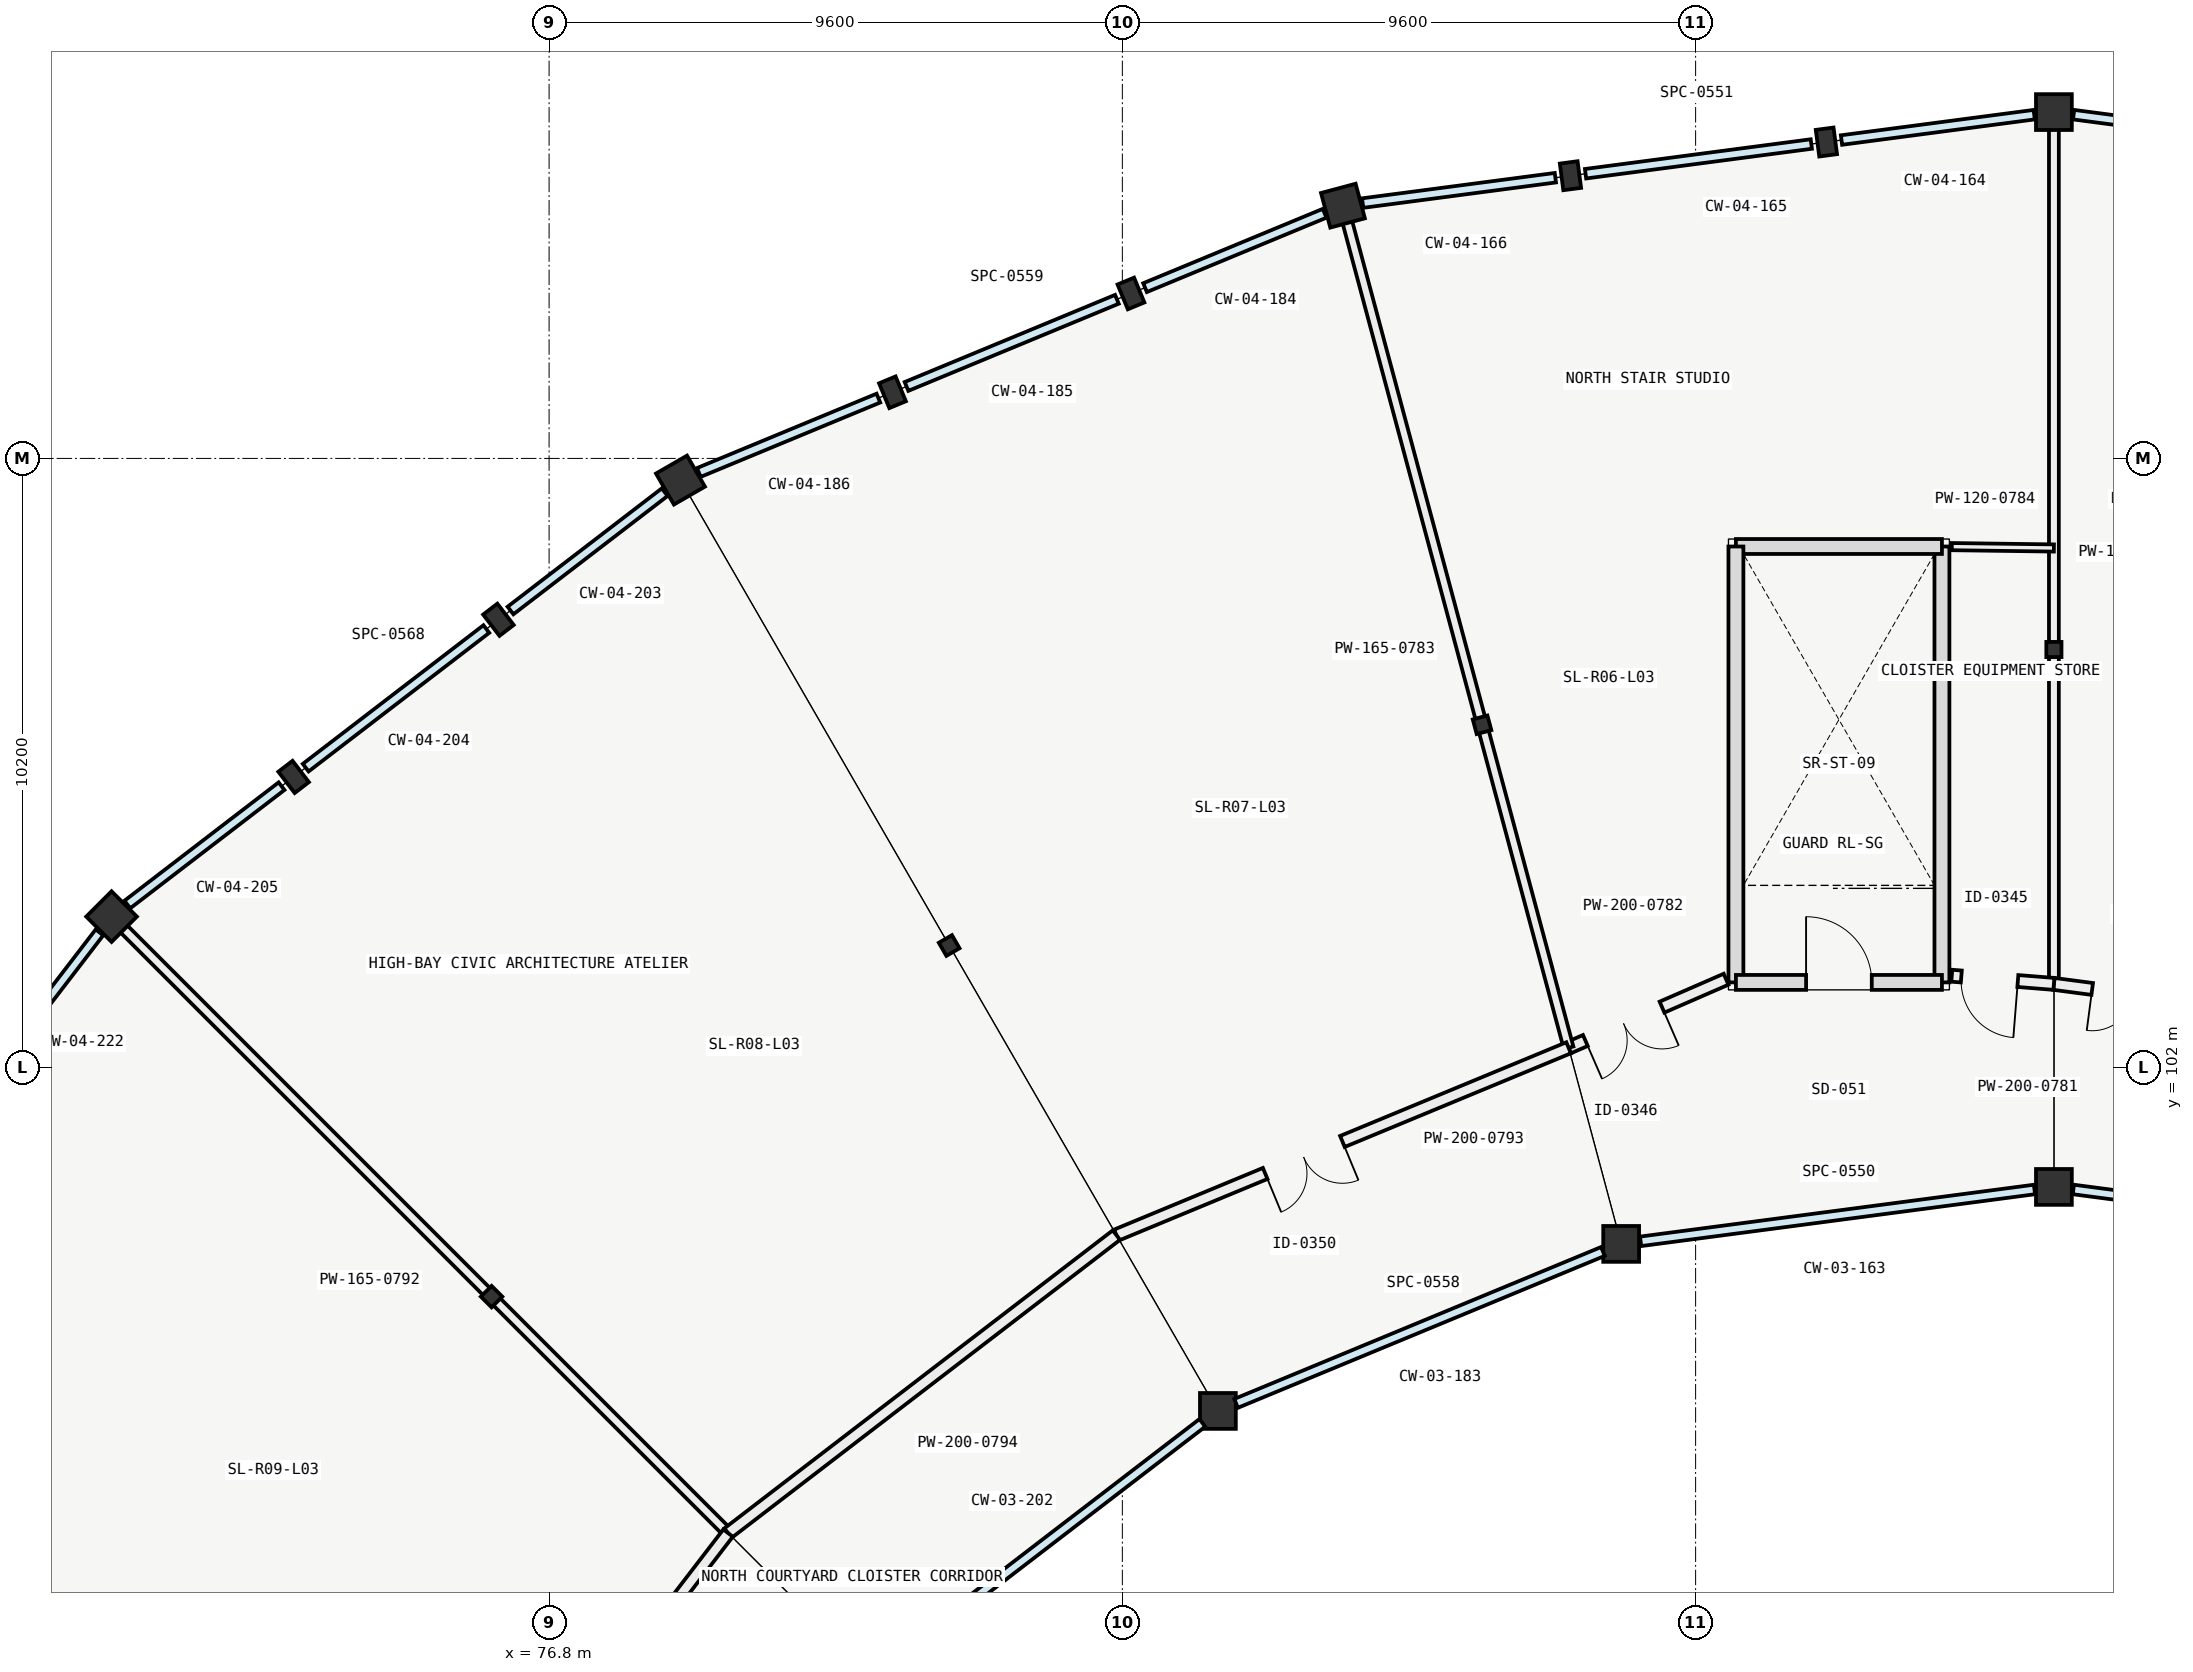
"""IFC4 building model, lengths in metres.
Left out: names, types, materials, properties, quantities, classifications, styles, units other than length and angle.
Written with IfcOpenShell. Run it as: python <this file> out.ifc"""

import sys

from ifc_helpers import new_model, si_unit, direction, frame, frame_2d, origin, origin_2d, place, context, subcontext, project, spatial, rectangle, circle, i_section, extrude, element, fill, save


model = new_model("IFC4")
c1 = context("Model", 3, precision=1e-05, world=origin(), true_north=direction((0.0, 1.0)))
c2 = subcontext(c1, "Body", "Model", "MODEL_VIEW")
j1 = project(units=[si_unit("LENGTHUNIT", "METRE"), si_unit("PLANEANGLEUNIT", "RADIAN")], contexts=[c1])
p1 = place(None, origin())
s1 = spatial("IfcSite", under=j1, at=p1, CompositionType="ELEMENT")
p2 = place(p1, origin())
s2 = spatial("IfcBuilding", under=s1, at=p2, CompositionType="ELEMENT")
p3 = place(p2, frame((0.0, 0.0, 13.8)))
s3 = spatial("IfcBuildingStorey", under=s2, at=p3, CompositionType="ELEMENT", Elevation=13.8)
p4 = place(p3, frame((102.0, 100.0, 0.0), z_axis=(0.0, 0.0, 1.0), x_axis=(0.0, 1.0, 0.0)))
e1 = element("IfcColumn", 1, at=p4, inside=s3, PredefinedType="COLUMN", context=c2, shape_type="SweptSolid", body=[
    extrude(circle(Radius=0.3, at=origin_2d()), origin(), (0.0, 0.0, 1.0), 4.2),
])
p5 = place(p3, frame((102.0, 109.0, 0.0), z_axis=(0.0, 0.0, 1.0), x_axis=(0.0, 1.0, 0.0)))
e2 = element("IfcColumn", 2, at=p5, inside=s3, PredefinedType="COLUMN", context=c2, shape_type="SweptSolid", body=[
    extrude(i_section(OverallWidth=0.254, OverallDepth=0.254, WebThickness=0.009, FlangeThickness=0.014, FilletRadius=0.014, at=origin_2d()), origin(), (0.0, 0.0, 1.0), 4.2),
])
p6 = place(p3, frame((102.0, 118.0, 0.0), z_axis=(0.0, 0.0, 1.0), x_axis=(0.0, 1.0, 0.0)))
e3 = element("IfcColumn", 3, at=p6, inside=s3, PredefinedType="COLUMN", context=c2, shape_type="SweptSolid", body=[
    extrude(rectangle(XDim=0.6, YDim=0.6, at=origin_2d()), origin(), (0.0, 0.0, 1.0), 4.2),
])
p7 = place(p3, frame((94.753, 99.046, 0.0), z_axis=(0.0, 0.0, 1.0), x_axis=(-0.258819045103, 0.965925826289, 0.0)))
e4 = element("IfcColumn", 4, at=p7, inside=s3, PredefinedType="COLUMN", context=c2, shape_type="SweptSolid", body=[
    extrude(circle(Radius=0.3, at=origin_2d()), origin(), (0.0, 0.0, 1.0), 4.2),
])
p8 = place(p3, frame((92.424, 107.739, 0.0), z_axis=(0.0, 0.0, 1.0), x_axis=(-0.258819045103, 0.965925826289, 0.0)))
e5 = element("IfcColumn", 5, at=p8, inside=s3, PredefinedType="COLUMN", context=c2, shape_type="SweptSolid", body=[
    extrude(i_section(OverallWidth=0.254, OverallDepth=0.254, WebThickness=0.009, FlangeThickness=0.014, FilletRadius=0.014, at=origin_2d()), origin(), (0.0, 0.0, 1.0), 4.2),
])
p9 = place(p3, frame((90.094, 116.433, 0.0), z_axis=(0.0, 0.0, 1.0), x_axis=(-0.258819045103, 0.965925826289, 0.0)))
e6 = element("IfcColumn", 6, at=p9, inside=s3, PredefinedType="COLUMN", context=c2, shape_type="SweptSolid", body=[
    extrude(rectangle(XDim=0.6, YDim=0.6, at=origin_2d()), origin(), (0.0, 0.0, 1.0), 4.2),
])
p10 = place(p3, frame((88.0, 96.249, 0.0), z_axis=(0.0, 0.0, 1.0), x_axis=(-0.5, 0.866025403784, 0.0)))
e7 = element("IfcColumn", 7, at=p10, inside=s3, PredefinedType="COLUMN", context=c2, shape_type="SweptSolid", body=[
    extrude(circle(Radius=0.3, at=origin_2d()), origin(), (0.0, 0.0, 1.0), 4.2),
])
p11 = place(p3, frame((83.5, 104.043, 0.0), z_axis=(0.0, 0.0, 1.0), x_axis=(-0.5, 0.866025403784, 0.0)))
e8 = element("IfcColumn", 8, at=p11, inside=s3, PredefinedType="COLUMN", context=c2, shape_type="SweptSolid", body=[
    extrude(i_section(OverallWidth=0.254, OverallDepth=0.254, WebThickness=0.009, FlangeThickness=0.014, FilletRadius=0.014, at=origin_2d()), origin(), (0.0, 0.0, 1.0), 4.2),
])
p12 = place(p3, frame((79.0, 111.837, 0.0), z_axis=(0.0, 0.0, 1.0), x_axis=(-0.5, 0.866025403784, 0.0)))
e9 = element("IfcColumn", 9, at=p12, inside=s3, PredefinedType="COLUMN", context=c2, shape_type="SweptSolid", body=[
    extrude(rectangle(XDim=0.6, YDim=0.6, at=origin_2d()), origin(), (0.0, 0.0, 1.0), 4.2),
])
p13 = place(p3, frame((75.837, 98.163, 0.0), z_axis=(0.0, 0.0, 1.0), x_axis=(-0.707106781187, 0.707106781187, 0.0)))
e10 = element("IfcColumn", 10, at=p13, inside=s3, PredefinedType="COLUMN", context=c2, shape_type="SweptSolid", body=[
    extrude(i_section(OverallWidth=0.254, OverallDepth=0.254, WebThickness=0.009, FlangeThickness=0.014, FilletRadius=0.014, at=origin_2d()), origin(), (0.0, 0.0, 1.0), 4.2),
])
p14 = place(p3, frame((69.473, 104.527, 0.0), z_axis=(0.0, 0.0, 1.0), x_axis=(-0.707106781187, 0.707106781187, 0.0)))
e11 = element("IfcColumn", 11, at=p14, inside=s3, PredefinedType="COLUMN", context=c2, shape_type="SweptSolid", body=[
    extrude(rectangle(XDim=0.6, YDim=0.6, at=origin_2d()), origin(), (0.0, 0.0, 1.0), 4.2),
])
for number, where, z_axis, x_axis in (
    (12, (98.19, 117.498, 0.0), (0.0, 0.0, 1.0), (0.991, 0.131, 0.0)),
    (13, (93.904, 116.934, 0.0), (0.0, 0.0, 1.0), (0.991, 0.131, 0.0)),
    (14, (86.544, 114.962, 0.0), (0.0, 0.0, 1.0), (0.924, 0.383, 0.0)),
    (15, (82.55, 113.308, 0.0), (0.0, 0.0, 1.0), (0.924, 0.383, 0.0)),
    (16, (75.951, 109.498, 0.0), (0.0, 0.0, 1.0), (0.793, 0.609, 0.0)),
    (17, (72.522, 106.866, 0.0), (0.0, 0.0, 1.0), (0.793, 0.609, 0.0)),
):
    element("IfcColumn", number, at=place(p3, frame(where, z_axis=z_axis, x_axis=x_axis)), inside=s3, PredefinedType="PILASTER", context=c2, shape_type="SweptSolid", body=[
        extrude(rectangle(XDim=0.3, YDim=0.45, at=origin_2d()), origin(), (0.0, 0.0, 1.0), 4.2),
    ])
p15 = place(p3, frame((100.125, 103.425, 0.0), z_axis=(0.0, 0.0, 1.0), x_axis=(0.0, 1.0, 0.0)))
e18 = element("IfcWall", 18, at=p15, inside=s3, PredefinedType="SOLIDWALL", context=c2, shape_type="SweptSolid", body=[
    extrude(rectangle(XDim=7.3, YDim=0.25, at=frame_2d((3.65, 0.0))), origin(), (0.0, 0.0, 1.0), 3.15),
])
p16 = place(p3, frame((100.125, 110.725, 0.0), z_axis=(0.0, 0.0, 1.0), x_axis=(-1.0, 0.0, 0.0)))
e19 = element("IfcWall", 19, at=p16, inside=s3, PredefinedType="SOLIDWALL", context=c2, shape_type="SweptSolid", body=[
    extrude(rectangle(XDim=3.45, YDim=0.25, at=frame_2d((1.725, 0.0))), origin(), (0.0, 0.0, 1.0), 3.15),
])
p17 = place(p3, frame((96.675, 110.725, 0.0), z_axis=(0.0, 0.0, 1.0), x_axis=(0.0, -1.0, 0.0)))
e20 = element("IfcWall", 20, at=p17, inside=s3, PredefinedType="SOLIDWALL", context=c2, shape_type="SweptSolid", body=[
    extrude(rectangle(XDim=7.3, YDim=0.25, at=frame_2d((3.65, 0.0))), origin(), (0.0, 0.0, 1.0), 3.15),
])
p18 = place(p3, frame((96.675, 103.425, 0.0), z_axis=(0.0, 0.0, 1.0), x_axis=(1.0, 0.0, 0.0)))
e21 = element("IfcWall", 21, at=p18, inside=s3, PredefinedType="SOLIDWALL", context=c2, shape_type="SweptSolid", body=[
    extrude(rectangle(XDim=3.45, YDim=0.25, at=frame_2d((1.725, 0.0))), origin(), (0.0, 0.0, 1.0), 3.15),
])
p19 = place(p18, frame((1.175, 0.0, 0.0)))
e22 = element("IfcOpeningElement", 22, at=p19, cuts=e21, PredefinedType="OPENING", context=c2, shape_type="SweptSolid", body=[
    extrude(rectangle(XDim=1.1, YDim=2.2, at=frame_2d((0.55, 1.1))), frame((0.0, 0.135, 0.0), z_axis=(0.0, -1.0, 0.0), x_axis=(1.0, 0.0, 0.0)), (0.0, 0.0, 1.0), 0.27),
])
p20 = place(p3, frame((102.0, 103.4, 0.0), z_axis=(0.0, 0.0, 1.0), x_axis=(0.0, 1.0, 0.0)))
e23 = element("IfcWall", 23, at=p20, inside=s3, PredefinedType="PARTITIONING", context=c2, shape_type="SweptSolid", body=[
    extrude(rectangle(XDim=14.48, YDim=0.165, at=frame_2d((7.24, 0.0))), origin(), (0.0, 0.0, 1.0), 3.85),
])
p21 = place(p3, frame((110.127, 102.33, 0.0), z_axis=(0.0, 0.0, 1.0), x_axis=(-0.991446589332, 0.130513066404, 0.0)))
e24 = element("IfcWall", 24, at=p21, inside=s3, PredefinedType="PARTITIONING", context=c2, shape_type="SweptSolid", body=[
    extrude(rectangle(XDim=8.197, YDim=0.2, at=frame_2d((4.099, 0.0))), origin(), (0.0, 0.0, 1.0), 3.85),
])
p22 = place(p21, frame((2.05, 0.0, 0.0)))
e25 = element("IfcOpeningElement", 25, at=p22, cuts=e24, PredefinedType="OPENING", context=c2, shape_type="SweptSolid", body=[
    extrude(rectangle(XDim=0.9, YDim=2.05, at=frame_2d((0.45, 1.025))), frame((0.0, 0.11, 0.0), z_axis=(0.0, -1.0, 0.0), x_axis=(1.0, 0.0, 0.0)), (0.0, 0.0, 1.0), 0.22),
])
p23 = place(p21, frame((6.15, 0.0, 0.0)))
e26 = element("IfcOpeningElement", 26, at=p23, cuts=e24, PredefinedType="OPENING", context=c2, shape_type="SweptSolid", body=[
    extrude(rectangle(XDim=1.4, YDim=2.2, at=frame_2d((0.7, 1.1))), frame((0.0, 0.11, 0.0), z_axis=(0.0, -1.0, 0.0), x_axis=(1.0, 0.0, 0.0)), (0.0, 0.0, 1.0), 0.22),
])
p24 = place(p3, frame((102.0, 103.4, 0.0), z_axis=(0.0, 0.0, 1.0), x_axis=(-0.996807580938, 0.07984138391, 0.0)))
e27 = element("IfcWall", 27, at=p24, inside=s3, PredefinedType="PARTITIONING", context=c2, shape_type="SweptSolid", body=[
    extrude(rectangle(XDim=1.715, YDim=0.2, at=frame_2d((0.858, 0.0))), origin(), (0.0, 0.0, 1.0), 3.85),
])
p25 = place(p24, frame((0.605, 0.0, 0.0)))
e28 = element("IfcOpeningElement", 28, at=p25, cuts=e27, PredefinedType="OPENING", context=c2, shape_type="SweptSolid", body=[
    extrude(rectangle(XDim=0.95, YDim=2.1, at=frame_2d((0.475, 1.05))), frame((0.0, 0.11, 0.0), z_axis=(0.0, -1.0, 0.0), x_axis=(1.0, 0.0, 0.0)), (0.0, 0.0, 1.0), 0.22),
])
p26 = place(p3, frame((96.51, 103.478, 0.0), z_axis=(0.0, 0.0, 1.0), x_axis=(-0.916855346374, -0.399219580964, 0.0)))
e29 = element("IfcWall", 29, at=p26, inside=s3, PredefinedType="PARTITIONING", context=c2, shape_type="SweptSolid", body=[
    extrude(rectangle(XDim=2.876, YDim=0.2, at=frame_2d((1.438, 0.0))), origin(), (0.0, 0.0, 1.0), 3.85),
])
p27 = place(p26, frame((1.17, 0.0, 0.0)))
e30 = element("IfcOpeningElement", 30, at=p27, cuts=e29, PredefinedType="OPENING", context=c2, shape_type="SweptSolid", body=[
    extrude(rectangle(XDim=1.4, YDim=2.2, at=frame_2d((0.7, 1.1))), frame((0.0, 0.11, 0.0), z_axis=(0.0, -1.0, 0.0), x_axis=(1.0, 0.0, 0.0)), (0.0, 0.0, 1.0), 0.22),
])
p28 = place(p3, frame((93.873, 102.33, 0.0), z_axis=(0.0, 0.0, 1.0), x_axis=(-0.258810530041, 0.965928107853, 0.0)))
e31 = element("IfcWall", 31, at=p28, inside=s3, PredefinedType="PARTITIONING", context=c2, shape_type="SweptSolid", body=[
    extrude(rectangle(XDim=14.48, YDim=0.165, at=frame_2d((7.24, 0.0))), origin(), (0.0, 0.0, 1.0), 3.85),
])
p29 = place(p3, frame((100.29, 110.723, 0.0), z_axis=(0.0, 0.0, 1.0), x_axis=(0.999909951855, -0.013419693814, 0.0)))
e32 = element("IfcWall", 32, at=p29, inside=s3, PredefinedType="PARTITIONING", context=c2, shape_type="SweptSolid", body=[
    extrude(rectangle(XDim=1.71, YDim=0.12, at=frame_2d((0.855, 0.0))), origin(), (0.0, 0.0, 1.0), 3.85),
])
p30 = place(p3, frame((79.797, 94.203, 0.0), z_axis=(0.0, 0.0, 1.0), x_axis=(-0.707106781187, 0.707106781187, 0.0)))
e33 = element("IfcWall", 33, at=p30, inside=s3, PredefinedType="PARTITIONING", context=c2, shape_type="SweptSolid", body=[
    extrude(rectangle(XDim=14.48, YDim=0.165, at=frame_2d((7.24, 0.0))), origin(), (0.0, 0.0, 1.0), 3.828),
])
p31 = place(p3, frame((93.873, 102.33, 0.0), z_axis=(0.0, 0.0, 1.0), x_axis=(-0.923874167149, -0.382696385238, 0.0)))
e34 = element("IfcWall", 34, at=p31, inside=s3, PredefinedType="PARTITIONING", context=c2, shape_type="SweptSolid", body=[
    extrude(rectangle(XDim=8.197, YDim=0.2, at=frame_2d((4.099, 0.0))), origin(), (0.0, 0.0, 1.0), 3.85),
])
p32 = place(p31, frame((4.1, 0.0, 0.0)))
e35 = element("IfcOpeningElement", 35, at=p32, cuts=e34, PredefinedType="OPENING", context=c2, shape_type="SweptSolid", body=[
    extrude(rectangle(XDim=1.4, YDim=2.2, at=frame_2d((0.7, 1.1))), frame((0.0, 0.11, 0.0), z_axis=(0.0, -1.0, 0.0), x_axis=(1.0, 0.0, 0.0)), (0.0, 0.0, 1.0), 0.22),
])
p33 = place(p3, frame((86.3, 99.193, 0.0), z_axis=(0.0, 0.0, 1.0), x_axis=(-0.793357497113, -0.608756011694, 0.0)))
e36 = element("IfcWall", 36, at=p33, inside=s3, PredefinedType="PARTITIONING", context=c2, shape_type="SweptSolid", body=[
    extrude(rectangle(XDim=8.197, YDim=0.2, at=frame_2d((4.099, 0.0))), origin(), (0.0, 0.0, 1.0), 3.85),
])
p34 = place(p3, frame((79.797, 94.203, 0.0), z_axis=(0.0, 0.0, 1.0), x_axis=(-0.608756011694, -0.793357497113, 0.0)))
e37 = element("IfcWall", 37, at=p34, inside=s3, PredefinedType="PARTITIONING", context=c2, shape_type="SweptSolid", body=[
    extrude(rectangle(XDim=8.197, YDim=0.2, at=frame_2d((4.099, 0.0))), origin(), (0.0, 0.0, 1.0), 3.777),
])
p35 = place(p34, frame((4.1, 0.0, 0.0)))
e38 = element("IfcOpeningElement", 38, at=p35, cuts=e37, PredefinedType="OPENING", context=c2, shape_type="SweptSolid", body=[
    extrude(rectangle(XDim=1.4, YDim=2.2, at=frame_2d((0.7, 1.1))), frame((0.0, 0.11, 0.0), z_axis=(0.0, -1.0, 0.0), x_axis=(1.0, 0.0, 0.0)), (0.0, 0.0, 1.0), 0.22),
])
p36 = place(p19, origin())
e39 = element("IfcDoor", 39, at=p36, inside=s3, OperationType="SINGLE_SWING_LEFT", PredefinedType="DOOR", context=c2, shape_type="SweptSolid", body=[
    extrude(rectangle(XDim=1.1, YDim=2.2, at=frame_2d((0.55, 1.1))), frame((0.0, 0.025, 0.0), z_axis=(0.0, -1.0, 0.0), x_axis=(1.0, 0.0, 0.0)), (0.0, 0.0, 1.0), 0.05),
])
fill(e22, e39)
p37 = place(p23, origin())
e40 = element("IfcDoor", 40, at=p37, inside=s3, OperationType="DOUBLE_DOOR_SINGLE_SWING", PredefinedType="DOOR", context=c2, shape_type="SweptSolid", body=[
    extrude(rectangle(XDim=1.4, YDim=2.2, at=frame_2d((0.7, 1.1))), frame((0.0, 0.025, 0.0), z_axis=(0.0, -1.0, 0.0), x_axis=(1.0, 0.0, 0.0)), (0.0, 0.0, 1.0), 0.05),
])
fill(e26, e40)
p38 = place(p25, origin())
e41 = element("IfcDoor", 41, at=p38, inside=s3, OperationType="SINGLE_SWING_LEFT", PredefinedType="DOOR", context=c2, shape_type="SweptSolid", body=[
    extrude(rectangle(XDim=0.95, YDim=2.1, at=frame_2d((0.475, 1.05))), frame((0.0, 0.025, 0.0), z_axis=(0.0, -1.0, 0.0), x_axis=(1.0, 0.0, 0.0)), (0.0, 0.0, 1.0), 0.05),
])
fill(e28, e41)
p39 = place(p27, origin())
e42 = element("IfcDoor", 42, at=p39, inside=s3, OperationType="DOUBLE_DOOR_SINGLE_SWING", PredefinedType="DOOR", context=c2, shape_type="SweptSolid", body=[
    extrude(rectangle(XDim=1.4, YDim=2.2, at=frame_2d((0.7, 1.1))), frame((0.0, 0.025, 0.0), z_axis=(0.0, -1.0, 0.0), x_axis=(1.0, 0.0, 0.0)), (0.0, 0.0, 1.0), 0.05),
])
fill(e30, e42)
p40 = place(p32, origin())
e43 = element("IfcDoor", 43, at=p40, inside=s3, OperationType="DOUBLE_DOOR_SINGLE_SWING", PredefinedType="DOOR", context=c2, shape_type="SweptSolid", body=[
    extrude(rectangle(XDim=1.4, YDim=2.2, at=frame_2d((0.7, 1.1))), frame((0.0, 0.025, 0.0), z_axis=(0.0, -1.0, 0.0), x_axis=(1.0, 0.0, 0.0)), (0.0, 0.0, 1.0), 0.05),
])
fill(e35, e43)
save(model, sys.argv[1])
